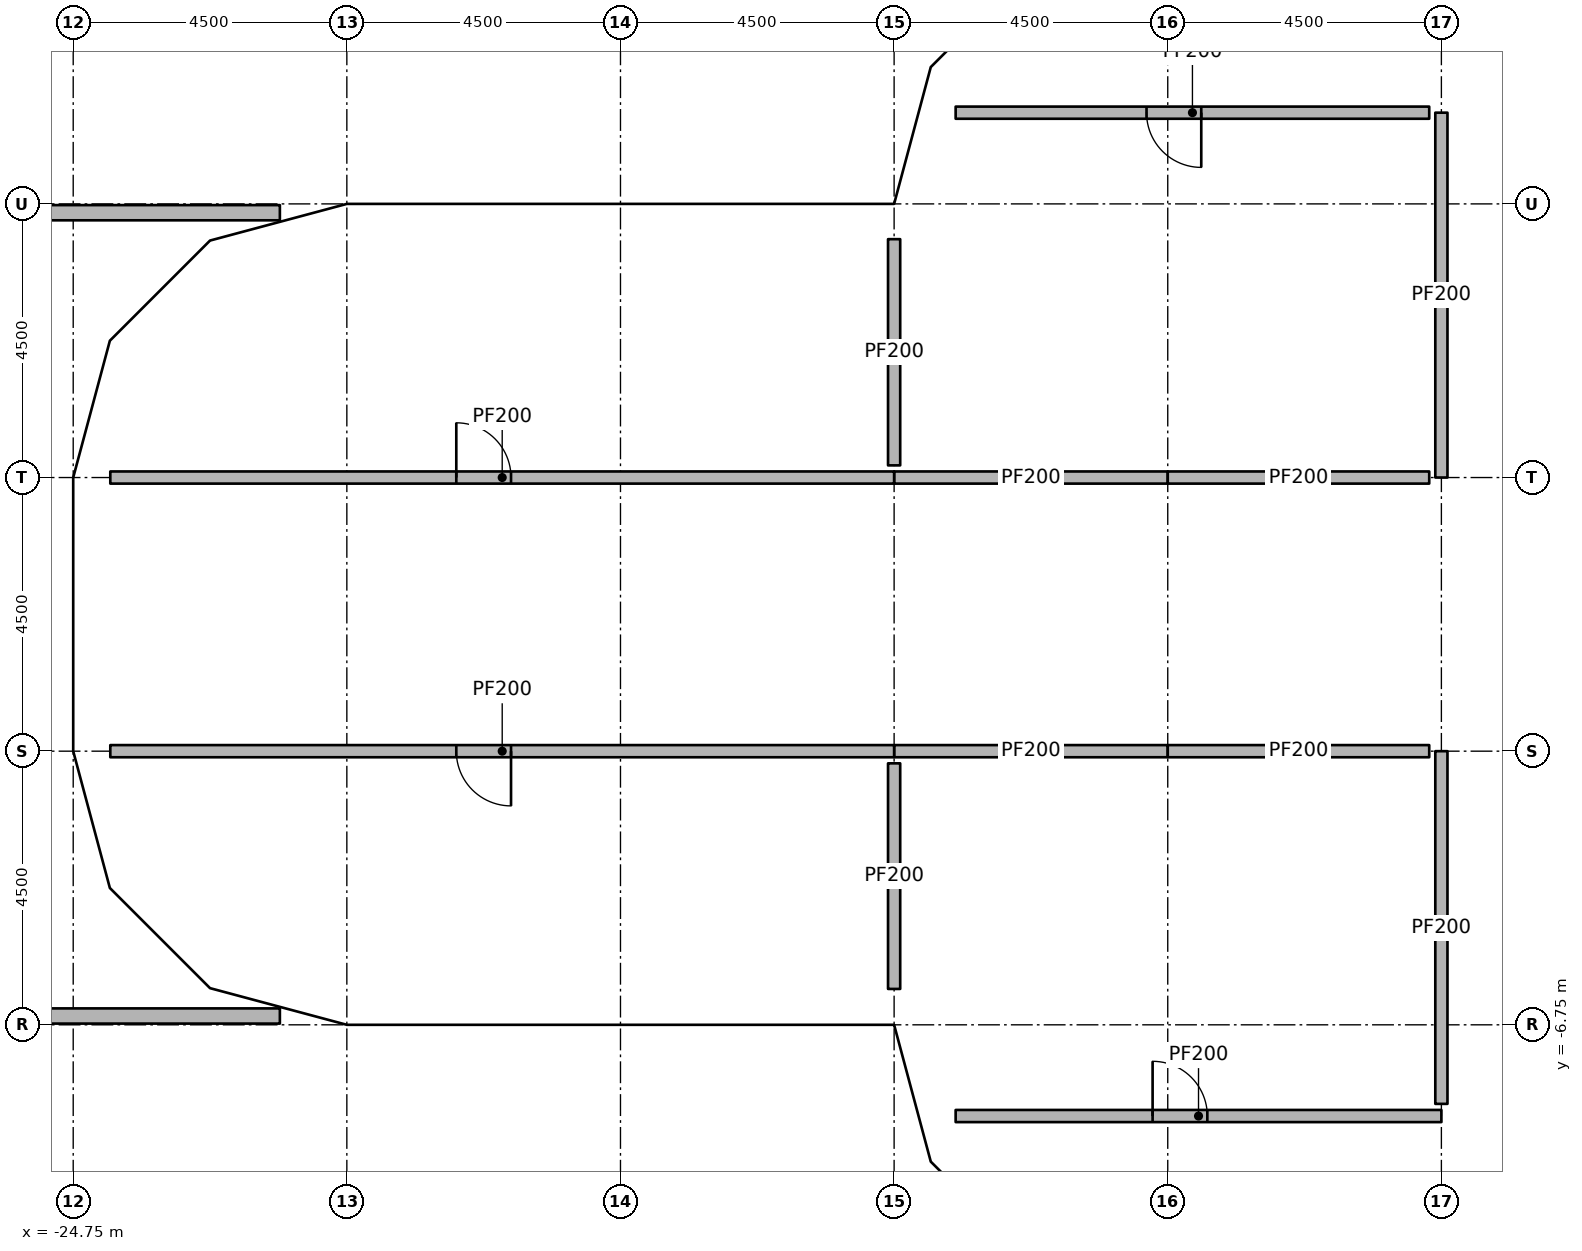
"""IFC4 building model, lengths in metres.
Left out: names, types, materials, properties, quantities, classifications, styles, units other than length and angle.
Written with IfcOpenShell. Run it as: python <this file> out.ifc"""

import sys

from ifc_helpers import new_model, si_unit, direction, frame, frame_2d, origin, origin_2d, place, context, subcontext, project, spatial, polyline, rectangle, outline, extrude, element, fill, save


model = new_model("IFC4")
c1 = context("Model", 3, precision=1e-05, world=origin(), true_north=direction((0.0, 1.0)))
c2 = subcontext(c1, "Body", "Model", "MODEL_VIEW")
j1 = project(units=[si_unit("LENGTHUNIT", "METRE"), si_unit("PLANEANGLEUNIT", "RADIAN")], contexts=[c1])
p1 = place(None, origin())
s1 = spatial("IfcSite", under=j1, at=p1, CompositionType="ELEMENT")
p2 = place(p1, origin())
s2 = spatial("IfcBuilding", under=s1, at=p2, CompositionType="ELEMENT")
p3 = place(p2, frame((0.0, 0.0, 291.6)))
s3 = spatial("IfcBuildingStorey", under=s2, at=p3, CompositionType="ELEMENT", Elevation=291.6)
for number, where, z_axis, x_axis in (
    (1, (-20.25, -6.11, 0.0), (0.0, 0.0, 1.0), (1.0, 0.0, 0.0)),
    (2, (-20.25, 6.11, 0.0), (0.0, 0.0, 1.0), (1.0, 0.0, 0.0)),
    (3, (-15.75, -6.25, 0.0), (0.0, 0.0, 1.0), (1.0, 0.0, 0.0)),
    (4, (-15.75, 6.25, 0.0), (0.0, 0.0, 1.0), (1.0, 0.0, 0.0)),
    (5, (-10.75, -6.25, 0.0), (0.0, 0.0, 1.0), (1.0, 0.0, 0.0)),
    (6, (-10.75, 6.25, 0.0), (0.0, 0.0, 1.0), (1.0, 0.0, 0.0)),
    (7, (-6.25, -6.25, 0.0), (0.0, 0.0, 1.0), (1.0, 0.0, 0.0)),
    (8, (-6.25, 6.25, 0.0), (0.0, 0.0, 1.0), (1.0, 0.0, 0.0)),
):
    element("IfcColumn", number, at=place(p3, frame(where, z_axis=z_axis, x_axis=x_axis)), inside=s3, PredefinedType="COLUMN", context=c2, shape_type="SweptSolid", body=[
        extrude(rectangle(XDim=0.6, YDim=0.6, at=origin_2d()), origin(), (0.0, 0.0, 1.0), 3.45),
    ])
p4 = place(p3, origin())
e9 = element("IfcWall", 9, at=p4, inside=s3, PredefinedType="PARAPET", context=c2, shape_type="SweptSolid", body=[
    extrude(outline(polyline([(-21.351, -6.73), (-26.997, -6.73), (-26.965, -6.48), (-21.351, -6.48), (-21.351, -6.73)])), origin(), (0.0, 0.0, 1.0), 1.22),
])
p5 = place(p3, origin())
e10 = element("IfcWall", 10, at=p5, inside=s3, PredefinedType="PARAPET", context=c2, shape_type="SweptSolid", body=[
    extrude(outline(polyline([(-26.997, 6.73), (-21.351, 6.73), (-21.351, 6.48), (-26.965, 6.48), (-26.997, 6.73)])), origin(), (0.0, 0.0, 1.0), 1.22),
])
p6 = place(p3, frame((-2.25, 2.25, 0.0), z_axis=(0.0, 0.0, 1.0), x_axis=(0.0, 1.0, 0.0)))
e11 = element("IfcWall", 11, at=p6, inside=s3, PredefinedType="PARTITIONING", context=c2, shape_type="SweptSolid", body=[
    extrude(rectangle(XDim=6.0, YDim=0.2, at=frame_2d((3.0, 0.0))), origin(), (0.0, 0.0, 1.0), 2.681),
])
p7 = place(p3, frame((-2.45, 8.25, 0.0), z_axis=(0.0, 0.0, 1.0), x_axis=(-1.0, 0.0, 0.0)))
e12 = element("IfcWall", 12, at=p7, inside=s3, PredefinedType="PARTITIONING", context=c2, shape_type="SweptSolid", body=[
    extrude(rectangle(XDim=7.788, YDim=0.2, at=frame_2d((3.894, 0.0))), origin(), (0.0, 0.0, 1.0), 3.45),
])
p8 = place(p7, frame((3.749, 0.0, 0.0)))
e13 = element("IfcOpeningElement", 13, at=p8, cuts=e12, PredefinedType="OPENING", context=c2, shape_type="SweptSolid", body=[
    extrude(rectangle(XDim=0.9, YDim=2.1, at=frame_2d((0.45, 1.05))), frame((0.0, 0.11, 0.0), z_axis=(0.0, -1.0, 0.0), x_axis=(1.0, 0.0, 0.0)), (0.0, 0.0, 1.0), 0.22),
])
p9 = place(p3, frame((-10.238, -8.25, 0.0), z_axis=(0.0, 0.0, 1.0), x_axis=(1.0, 0.0, 0.0)))
e14 = element("IfcWall", 14, at=p9, inside=s3, PredefinedType="PARTITIONING", context=c2, shape_type="SweptSolid", body=[
    extrude(rectangle(XDim=7.988, YDim=0.2, at=frame_2d((3.994, 0.0))), origin(), (0.0, 0.0, 1.0), 3.45),
])
p10 = place(p9, frame((3.239, 0.0, 0.0)))
e15 = element("IfcOpeningElement", 15, at=p10, cuts=e14, PredefinedType="OPENING", context=c2, shape_type="SweptSolid", body=[
    extrude(rectangle(XDim=0.9, YDim=2.1, at=frame_2d((0.45, 1.05))), frame((0.0, 0.11, 0.0), z_axis=(0.0, -1.0, 0.0), x_axis=(1.0, 0.0, 0.0)), (0.0, 0.0, 1.0), 0.22),
])
p11 = place(p3, frame((-2.25, -8.05, 0.0), z_axis=(0.0, 0.0, 1.0), x_axis=(0.0, 1.0, 0.0)))
e16 = element("IfcWall", 16, at=p11, inside=s3, PredefinedType="PARTITIONING", context=c2, shape_type="SweptSolid", body=[
    extrude(rectangle(XDim=5.8, YDim=0.2, at=frame_2d((2.9, 0.0))), origin(), (0.0, 0.0, 1.0), 2.681),
])
p12 = place(p3, frame((-6.75, 2.25, 0.0), z_axis=(0.0, 0.0, 1.0), x_axis=(-1.0, 0.0, 0.0)))
e17 = element("IfcWall", 17, at=p12, inside=s3, PredefinedType="PARTITIONING", context=c2, shape_type="SweptSolid", body=[
    extrude(rectangle(XDim=4.5, YDim=0.2, at=frame_2d((2.25, 0.0))), origin(), (0.0, 0.0, 1.0), 2.828),
])
p13 = place(p3, frame((-11.25, 2.45, 0.0), z_axis=(0.0, 0.0, 1.0), x_axis=(0.0, 1.0, 0.0)))
e18 = element("IfcWall", 18, at=p13, inside=s3, PredefinedType="PARTITIONING", context=c2, shape_type="SweptSolid", body=[
    extrude(rectangle(XDim=3.72, YDim=0.2, at=frame_2d((1.86, 0.0))), origin(), (0.0, 0.0, 1.0), 3.45),
])
p14 = place(p3, frame((-2.45, 2.25, 0.0), z_axis=(0.0, 0.0, 1.0), x_axis=(-1.0, 0.0, 0.0)))
e19 = element("IfcWall", 19, at=p14, inside=s3, PredefinedType="PARTITIONING", context=c2, shape_type="SweptSolid", body=[
    extrude(rectangle(XDim=4.3, YDim=0.2, at=frame_2d((2.15, 0.0))), origin(), (0.0, 0.0, 1.0), 2.828),
])
p15 = place(p3, frame((-11.25, -2.25, 0.0), z_axis=(0.0, 0.0, 1.0), x_axis=(1.0, 0.0, 0.0)))
e20 = element("IfcWall", 20, at=p15, inside=s3, PredefinedType="PARTITIONING", context=c2, shape_type="SweptSolid", body=[
    extrude(rectangle(XDim=4.5, YDim=0.2, at=frame_2d((2.25, 0.0))), origin(), (0.0, 0.0, 1.0), 2.828),
])
p16 = place(p3, frame((-11.25, -6.16, 0.0), z_axis=(0.0, 0.0, 1.0), x_axis=(0.0, 1.0, 0.0)))
e21 = element("IfcWall", 21, at=p16, inside=s3, PredefinedType="PARTITIONING", context=c2, shape_type="SweptSolid", body=[
    extrude(rectangle(XDim=3.71, YDim=0.2, at=frame_2d((1.855, 0.0))), origin(), (0.0, 0.0, 1.0), 3.45),
])
p17 = place(p3, frame((-6.75, -2.25, 0.0), z_axis=(0.0, 0.0, 1.0), x_axis=(1.0, 0.0, 0.0)))
e22 = element("IfcWall", 22, at=p17, inside=s3, PredefinedType="PARTITIONING", context=c2, shape_type="SweptSolid", body=[
    extrude(rectangle(XDim=4.3, YDim=0.2, at=frame_2d((2.15, 0.0))), origin(), (0.0, 0.0, 1.0), 2.828),
])
p18 = place(p3, frame((-24.14, 2.25, 0.0), z_axis=(0.0, 0.0, 1.0), x_axis=(1.0, 0.0, 0.0)))
e23 = element("IfcWall", 23, at=p18, inside=s3, PredefinedType="PARTITIONING", context=c2, shape_type="SweptSolid", body=[
    extrude(rectangle(XDim=12.89, YDim=0.2, at=frame_2d((6.445, 0.0))), origin(), (0.0, 0.0, 1.0), 2.53),
])
p19 = place(p18, frame((5.69, 0.0, 0.0)))
e24 = element("IfcOpeningElement", 24, at=p19, cuts=e23, PredefinedType="OPENING", context=c2, shape_type="SweptSolid", body=[
    extrude(rectangle(XDim=0.9, YDim=2.1, at=frame_2d((0.45, 1.05))), frame((0.0, 0.11, 0.0), z_axis=(0.0, -1.0, 0.0), x_axis=(1.0, 0.0, 0.0)), (0.0, 0.0, 1.0), 0.22),
])
p20 = place(p3, frame((-11.25, -2.25, 0.0), z_axis=(0.0, 0.0, 1.0), x_axis=(-1.0, 0.0, 0.0)))
e25 = element("IfcWall", 25, at=p20, inside=s3, PredefinedType="PARTITIONING", context=c2, shape_type="SweptSolid", body=[
    extrude(rectangle(XDim=12.89, YDim=0.2, at=frame_2d((6.445, 0.0))), origin(), (0.0, 0.0, 1.0), 2.53),
])
p21 = place(p20, frame((6.3, 0.0, 0.0)))
e26 = element("IfcOpeningElement", 26, at=p21, cuts=e25, PredefinedType="OPENING", context=c2, shape_type="SweptSolid", body=[
    extrude(rectangle(XDim=0.9, YDim=2.1, at=frame_2d((0.45, 1.05))), frame((0.0, 0.11, 0.0), z_axis=(0.0, -1.0, 0.0), x_axis=(1.0, 0.0, 0.0)), (0.0, 0.0, 1.0), 0.22),
])
p22 = place(p8, origin())
e27 = element("IfcDoor", 27, at=p22, inside=s3, OperationType="SINGLE_SWING_LEFT", PredefinedType="DOOR", context=c2, shape_type="SweptSolid", body=[
    extrude(rectangle(XDim=0.9, YDim=2.1, at=frame_2d((0.45, 1.05))), frame((0.0, 0.025, 0.0), z_axis=(0.0, -1.0, 0.0), x_axis=(1.0, 0.0, 0.0)), (0.0, 0.0, 1.0), 0.05),
])
fill(e13, e27)
p23 = place(p10, origin())
e28 = element("IfcDoor", 28, at=p23, inside=s3, OperationType="SINGLE_SWING_LEFT", PredefinedType="DOOR", context=c2, shape_type="SweptSolid", body=[
    extrude(rectangle(XDim=0.9, YDim=2.1, at=frame_2d((0.45, 1.05))), frame((0.0, 0.025, 0.0), z_axis=(0.0, -1.0, 0.0), x_axis=(1.0, 0.0, 0.0)), (0.0, 0.0, 1.0), 0.05),
])
fill(e15, e28)
p24 = place(p19, origin())
e29 = element("IfcDoor", 29, at=p24, inside=s3, OperationType="SINGLE_SWING_LEFT", PredefinedType="DOOR", context=c2, shape_type="SweptSolid", body=[
    extrude(rectangle(XDim=0.9, YDim=2.1, at=frame_2d((0.45, 1.05))), frame((0.0, 0.025, 0.0), z_axis=(0.0, -1.0, 0.0), x_axis=(1.0, 0.0, 0.0)), (0.0, 0.0, 1.0), 0.05),
])
fill(e24, e29)
p25 = place(p21, origin())
e30 = element("IfcDoor", 30, at=p25, inside=s3, OperationType="SINGLE_SWING_LEFT", PredefinedType="DOOR", context=c2, shape_type="SweptSolid", body=[
    extrude(rectangle(XDim=0.9, YDim=2.1, at=frame_2d((0.45, 1.05))), frame((0.0, 0.025, 0.0), z_axis=(0.0, -1.0, 0.0), x_axis=(1.0, 0.0, 0.0)), (0.0, 0.0, 1.0), 0.05),
])
fill(e26, e30)
save(model, sys.argv[1])
